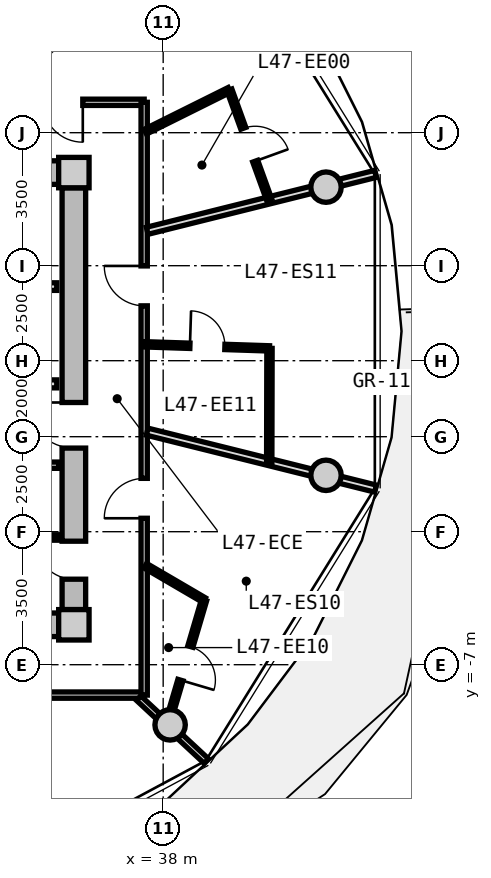
"""IFC4 building model, lengths in metres.
Left out: names, types, materials, properties, quantities, classifications, styles, units other than length and angle.
Written with IfcOpenShell. Run it as: python <this file> out.ifc"""

import sys

from ifc_helpers import new_model, si_unit, direction, frame, frame_2d, origin, origin_2d, place, context, subcontext, project, spatial, rectangle, circle, extrude, source, transform, mapped, element, fill, save


model = new_model("IFC4")
c1 = context("Model", 3, precision=1e-05, world=origin(), true_north=direction((0.0, 1.0)))
c2 = subcontext(c1, "Body", "Model", "MODEL_VIEW")
j1 = project(units=[si_unit("LENGTHUNIT", "METRE"), si_unit("PLANEANGLEUNIT", "RADIAN")], contexts=[c1])
p1 = place(None, origin())
s1 = spatial("IfcSite", under=j1, at=p1, CompositionType="ELEMENT")
p2 = place(p1, origin())
s2 = spatial("IfcBuilding", under=s1, at=p2, CompositionType="ELEMENT")
p3 = place(p2, frame((0.0, 0.0, 152.6)))
s3 = spatial("IfcBuildingStorey", under=s2, at=p3, CompositionType="ELEMENT", Elevation=152.6)
m1 = source(origin(), c2, "Body", "SweptSolid", [
    extrude(rectangle(XDim=0.8, YDim=0.8, at=origin_2d()), origin(), (0.0, 0.0, 1.0), 3.05),
])
for number, where, z_axis, x_axis in (
    (1, (35.65, -5.95, 0.0), (0.0, 0.0, 1.0), (1.0, 0.0, 0.0)),
    (2, (35.65, 5.95, 0.0), (0.0, 0.0, 1.0), (1.0, 0.0, 0.0)),
):
    element("IfcColumn", number, at=place(p3, frame(where, z_axis=z_axis, x_axis=x_axis)), inside=s3, PredefinedType="COLUMN", context=c2, shape_type="MappedRepresentation", body=[
        mapped(m1, transform((0.0, 0.0, 0.0), x_axis=(1.0, 0.0, 0.0), y_axis=(0.0, 1.0, 0.0), z_axis=(0.0, 0.0, 1.0), scale=1.0)),
    ])
m2 = source(origin(), c2, "Body", "SweptSolid", [
    extrude(rectangle(XDim=14.5, YDim=0.62, at=frame_2d((7.25, 0.0))), origin(), (0.0, 0.0, 1.0), 2.81),
])
for number, where, z_axis, x_axis in (
    (3, (20.75, 5.95, 0.0), (0.0, 0.0, 1.0), (1.0, 0.0, 0.0)),
    (4, (35.25, -5.95, 0.0), (0.0, 0.0, 1.0), (-1.0, 0.0, 0.0)),
):
    element("IfcWall", number, at=place(p3, frame(where, z_axis=z_axis, x_axis=x_axis)), inside=s3, PredefinedType="SHEAR", context=c2, shape_type="MappedRepresentation", body=[
        mapped(m2, transform((0.0, 0.0, 0.0), x_axis=(1.0, 0.0, 0.0), y_axis=(0.0, 1.0, 0.0), z_axis=(0.0, 0.0, 1.0), scale=1.0)),
    ])
m3 = source(origin(), c2, "Body", "SweptSolid", [
    extrude(rectangle(XDim=11.1, YDim=0.62, at=frame_2d((5.55, 0.0))), origin(), (0.0, 0.0, 1.0), 2.81),
])
p4 = place(p3, frame((35.65, 5.55, 0.0), z_axis=(0.0, 0.0, 1.0), x_axis=(0.0, -1.0, 0.0)))
e5 = element("IfcWall", 5, at=p4, inside=s3, PredefinedType="SHEAR", context=c2, shape_type="MappedRepresentation", body=[
    mapped(m3, transform((0.0, 0.0, 0.0), x_axis=(1.0, 0.0, 0.0), y_axis=(0.0, 1.0, 0.0), z_axis=(0.0, 0.0, 1.0), scale=1.0)),
])
p5 = place(p4, frame((5.65, 0.0, 0.0)))
e6 = element("IfcOpeningElement", 6, at=p5, cuts=e5, PredefinedType="OPENING", context=c2, shape_type="SweptSolid", body=[
    extrude(rectangle(XDim=1.2, YDim=2.15, at=frame_2d((0.6, 1.075))), frame((0.0, 0.32, 0.0), z_axis=(0.0, -1.0, 0.0), x_axis=(1.0, 0.0, 0.0)), (0.0, 0.0, 1.0), 0.64),
])
p6 = place(p4, frame((9.3, 0.0, 0.0)))
e7 = element("IfcOpeningElement", 7, at=p6, cuts=e5, PredefinedType="OPENING", context=c2, shape_type="SweptSolid", body=[
    extrude(rectangle(XDim=1.0, YDim=2.1, at=frame_2d((0.5, 1.05))), frame((0.0, 0.32, 0.0), z_axis=(0.0, -1.0, 0.0), x_axis=(1.0, 0.0, 0.0)), (0.0, 0.0, 1.0), 0.64),
])
m4 = source(origin(), c2, "Body", "SweptSolid", [
    extrude(circle(Radius=0.4, at=origin_2d()), origin(), (0.0, 0.0, 1.0), 3.05),
])
for number, where, z_axis, x_axis in (
    (8, (42.285, 5.567, 0.0), (0.0, 0.0, 1.0), (1.0, 0.0, 0.0)),
    (9, (38.183, -8.584, 0.0), (0.0, 0.0, 1.0), (1.0, 0.0, 0.0)),
    (10, (42.285, -2.016, 0.0), (0.0, 0.0, 1.0), (1.0, 0.0, 0.0)),
):
    element("IfcColumn", number, at=place(p3, frame(where, z_axis=z_axis, x_axis=x_axis)), inside=s3, PredefinedType="COLUMN", context=c2, shape_type="MappedRepresentation", body=[
        mapped(m4, transform((0.0, 0.0, 0.0), x_axis=(1.0, 0.0, 0.0), y_axis=(0.0, 1.0, 0.0), z_axis=(0.0, 0.0, 1.0), scale=1.0)),
    ])
m5 = source(origin(), c2, "Body", "SweptSolid", [
    extrude(rectangle(XDim=3.2, YDim=0.2, at=frame_2d((1.6, 0.0))), origin(), (0.0, 0.0, 1.0), 2.795),
])
p7 = place(p3, frame((32.0, 2.95, 0.0), z_axis=(0.0, 0.0, 1.0), x_axis=(1.0, 0.0, 0.0)))
e11 = element("IfcWall", 11, at=p7, inside=s3, PredefinedType="PARTITIONING", context=c2, shape_type="MappedRepresentation", body=[
    mapped(m5, transform((0.0, 0.0, 0.0), x_axis=(1.0, 0.0, 0.0), y_axis=(0.0, 1.0, 0.0), z_axis=(0.0, 0.0, 1.0), scale=1.0)),
])
m6 = source(origin(), c2, "Body", "SweptSolid", [
    extrude(rectangle(XDim=6.66, YDim=0.21, at=frame_2d((3.33, 0.0))), origin(), (0.0, 0.0, 1.0), 2.795),
])
p8 = place(p3, frame((28.54, 0.39, 0.0), z_axis=(0.0, 0.0, 1.0), x_axis=(1.0, 0.0, 0.0)))
e12 = element("IfcWall", 12, at=p8, inside=s3, PredefinedType="PARTITIONING", context=c2, shape_type="MappedRepresentation", body=[
    mapped(m6, transform((0.0, 0.0, 0.0), x_axis=(1.0, 0.0, 0.0), y_axis=(0.0, 1.0, 0.0), z_axis=(0.0, 0.0, 1.0), scale=1.0)),
])
p9 = place(p8, frame((1.0, 0.0, 0.0)))
e13 = element("IfcOpeningElement", 13, at=p9, cuts=e12, PredefinedType="OPENING", context=c2, shape_type="SweptSolid", body=[
    extrude(rectangle(XDim=1.2, YDim=2.15, at=frame_2d((0.6, 1.075))), frame((0.0, 0.115, 0.0), z_axis=(0.0, -1.0, 0.0), x_axis=(1.0, 0.0, 0.0)), (0.0, 0.0, 1.0), 0.23),
])
m7 = source(origin(), c2, "Body", "SweptSolid", [
    extrude(rectangle(XDim=2.7, YDim=0.165, at=frame_2d((1.35, 0.0))), origin(), (0.0, 0.0, 1.0), 2.795),
])
p10 = place(p3, frame((32.55, -1.75, 0.0), z_axis=(0.0, 0.0, 1.0), x_axis=(1.0, 0.0, 0.0)))
e14 = element("IfcWall", 14, at=p10, inside=s3, PredefinedType="PARTITIONING", context=c2, shape_type="MappedRepresentation", body=[
    mapped(m7, transform((0.0, 0.0, 0.0), x_axis=(1.0, 0.0, 0.0), y_axis=(0.0, 1.0, 0.0), z_axis=(0.0, 0.0, 1.0), scale=1.0)),
])
p11 = place(p10, frame((0.85, 0.0, 0.0)))
e15 = element("IfcOpeningElement", 15, at=p11, cuts=e14, PredefinedType="OPENING", context=c2, shape_type="SweptSolid", body=[
    extrude(rectangle(XDim=0.925, YDim=2.1, at=frame_2d((0.462, 1.05))), frame((0.0, 0.093, 0.0), z_axis=(0.0, -1.0, 0.0), x_axis=(1.0, 0.0, 0.0)), (0.0, 0.0, 1.0), 0.185),
])
m8 = source(origin(), c2, "Body", "SweptSolid", [
    extrude(rectangle(XDim=2.7, YDim=0.14, at=frame_2d((1.35, 0.0))), origin(), (0.0, 0.0, 1.0), 2.795),
])
p12 = place(p3, frame((32.55, -3.65, 0.0), z_axis=(0.0, 0.0, 1.0), x_axis=(1.0, 0.0, 0.0)))
e16 = element("IfcWall", 16, at=p12, inside=s3, PredefinedType="PARTITIONING", context=c2, shape_type="MappedRepresentation", body=[
    mapped(m8, transform((0.0, 0.0, 0.0), x_axis=(1.0, 0.0, 0.0), y_axis=(0.0, 1.0, 0.0), z_axis=(0.0, 0.0, 1.0), scale=1.0)),
])
m9 = source(origin(), c2, "Body", "SweptSolid", [
    extrude(rectangle(XDim=8.719, YDim=0.165, at=frame_2d((4.36, 0.0))), origin(), (0.0, 0.0, 1.0), 2.795),
])
p13 = place(p3, frame((28.781, 7.8, 0.0), z_axis=(0.0, 0.0, 1.0), x_axis=(1.0, 0.0, 0.0)))
e17 = element("IfcWall", 17, at=p13, inside=s3, PredefinedType="PARTITIONING", context=c2, shape_type="MappedRepresentation", body=[
    mapped(m9, transform((0.0, 0.0, 0.0), x_axis=(1.0, 0.0, 0.0), y_axis=(0.0, 1.0, 0.0), z_axis=(0.0, 0.0, 1.0), scale=1.0)),
])
p14 = place(p13, frame((6.054, 0.0, 0.0)))
e18 = element("IfcOpeningElement", 18, at=p14, cuts=e17, PredefinedType="OPENING", context=c2, shape_type="SweptSolid", body=[
    extrude(rectangle(XDim=1.05, YDim=2.15, at=frame_2d((0.525, 1.075))), frame((0.0, 0.093, 0.0), z_axis=(0.0, -1.0, 0.0), x_axis=(1.0, 0.0, 0.0)), (0.0, 0.0, 1.0), 0.185),
])
p15 = place(p13, frame((1.891, 0.0, 0.0)))
e19 = element("IfcOpeningElement", 19, at=p15, cuts=e17, PredefinedType="OPENING", context=c2, shape_type="SweptSolid", body=[
    extrude(rectangle(XDim=1.25, YDim=2.2, at=frame_2d((0.625, 1.1))), frame((0.0, 0.093, 0.0), z_axis=(0.0, -1.0, 0.0), x_axis=(1.0, 0.0, 0.0)), (0.0, 0.0, 1.0), 0.185),
])
m10 = source(origin(), c2, "Body", "SweptSolid", [
    extrude(rectangle(XDim=8.6, YDim=0.165, at=frame_2d((4.3, 0.0))), origin(), (0.0, 0.0, 1.0), 2.795),
])
p16 = place(p3, frame((37.5, -7.8, 0.0), z_axis=(0.0, 0.0, 1.0), x_axis=(-1.0, 0.0, 0.0)))
e20 = element("IfcWall", 20, at=p16, inside=s3, PredefinedType="PARTITIONING", context=c2, shape_type="MappedRepresentation", body=[
    mapped(m10, transform((0.0, 0.0, 0.0), x_axis=(1.0, 0.0, 0.0), y_axis=(0.0, 1.0, 0.0), z_axis=(0.0, 0.0, 1.0), scale=1.0)),
])
p17 = place(p16, frame((3.359, 0.0, 0.0)))
e21 = element("IfcOpeningElement", 21, at=p17, cuts=e20, PredefinedType="OPENING", context=c2, shape_type="SweptSolid", body=[
    extrude(rectangle(XDim=1.05, YDim=2.15, at=frame_2d((0.525, 1.075))), frame((0.0, 0.093, 0.0), z_axis=(0.0, -1.0, 0.0), x_axis=(1.0, 0.0, 0.0)), (0.0, 0.0, 1.0), 0.185),
])
m11 = source(origin(), c2, "Body", "SweptSolid", [
    extrude(rectangle(XDim=15.6, YDim=0.165, at=frame_2d((7.8, 0.0))), origin(), (0.0, 0.0, 1.0), 2.795),
])
p18 = place(p3, frame((37.5, 7.8, 0.0), z_axis=(0.0, 0.0, 1.0), x_axis=(0.0, -1.0, 0.0)))
e22 = element("IfcWall", 22, at=p18, inside=s3, PredefinedType="PARTITIONING", context=c2, shape_type="MappedRepresentation", body=[
    mapped(m11, transform((0.0, 0.0, 0.0), x_axis=(1.0, 0.0, 0.0), y_axis=(0.0, 1.0, 0.0), z_axis=(0.0, 0.0, 1.0), scale=1.0)),
])
p19 = place(p18, frame((9.896, 0.0, 0.0)))
e23 = element("IfcOpeningElement", 23, at=p19, cuts=e22, PredefinedType="OPENING", context=c2, shape_type="SweptSolid", body=[
    extrude(rectangle(XDim=1.05, YDim=2.15, at=frame_2d((0.525, 1.075))), frame((0.0, 0.093, 0.0), z_axis=(0.0, -1.0, 0.0), x_axis=(1.0, 0.0, 0.0)), (0.0, 0.0, 1.0), 0.185),
])
p20 = place(p18, frame((4.306, 0.0, 0.0)))
e24 = element("IfcOpeningElement", 24, at=p20, cuts=e22, PredefinedType="OPENING", context=c2, shape_type="SweptSolid", body=[
    extrude(rectangle(XDim=1.05, YDim=2.15, at=frame_2d((0.525, 1.075))), frame((0.0, 0.093, 0.0), z_axis=(0.0, -1.0, 0.0), x_axis=(1.0, 0.0, 0.0)), (0.0, 0.0, 1.0), 0.185),
])
m12 = source(origin(), c2, "Body", "SweptSolid", [
    extrude(rectangle(XDim=2.435, YDim=0.165, at=frame_2d((1.217, 0.0))), origin(), (0.0, 0.0, 1.0), 2.345),
])
p21 = place(p3, frame((37.354, -7.88, 0.0), z_axis=(0.0, 0.0, 1.0), x_axis=(0.732164643118, -0.681127693878, 0.0)))
e25 = element("IfcWall", 25, at=p21, inside=s3, PredefinedType="PARTITIONING", context=c2, shape_type="MappedRepresentation", body=[
    mapped(m12, transform((0.0, 0.0, 0.0), x_axis=(1.0, 0.0, 0.0), y_axis=(0.0, 1.0, 0.0), z_axis=(0.0, 0.0, 1.0), scale=1.0)),
])
m13 = source(origin(), c2, "Body", "SweptSolid", [
    extrude(rectangle(XDim=6.193, YDim=0.19, at=frame_2d((3.096, 0.0))), origin(), (0.0, 0.0, 1.0), 2.345),
])
p22 = place(p3, frame((37.58, -0.868, 0.0), z_axis=(0.0, 0.0, 1.0), x_axis=(0.970309243466, -0.241867674657, 0.0)))
e26 = element("IfcWall", 26, at=p22, inside=s3, PredefinedType="PARTITIONING", context=c2, shape_type="MappedRepresentation", body=[
    mapped(m13, transform((0.0, 0.0, 0.0), x_axis=(1.0, 0.0, 0.0), y_axis=(0.0, 1.0, 0.0), z_axis=(0.0, 0.0, 1.0), scale=1.0)),
])
m14 = source(origin(), c2, "Body", "SweptSolid", [
    extrude(rectangle(XDim=1.791, YDim=0.14, at=frame_2d((0.896, 0.0))), origin(), (0.0, 0.0, 1.0), 2.795),
])
p23 = place(p3, frame((37.53, -4.396, 0.0), z_axis=(0.0, 0.0, 1.0), x_axis=(0.863294053295, -0.504701275553, 0.0)))
e27 = element("IfcWall", 27, at=p23, inside=s3, PredefinedType="PARTITIONING", context=c2, shape_type="MappedRepresentation", body=[
    mapped(m14, transform((0.0, 0.0, 0.0), x_axis=(1.0, 0.0, 0.0), y_axis=(0.0, 1.0, 0.0), z_axis=(0.0, 0.0, 1.0), scale=1.0)),
])
m15 = source(origin(), c2, "Body", "SweptSolid", [
    extrude(rectangle(XDim=3.47, YDim=0.14, at=frame_2d((1.735, 0.0))), origin(), (0.0, 0.0, 1.0), 2.795),
])
p24 = place(p3, frame((39.076, -5.3, 0.0), z_axis=(0.0, 0.0, 1.0), x_axis=(-0.283194656898, -0.959062451723, 0.0)))
e28 = element("IfcWall", 28, at=p24, inside=s3, PredefinedType="PARTITIONING", context=c2, shape_type="MappedRepresentation", body=[
    mapped(m15, transform((0.0, 0.0, 0.0), x_axis=(1.0, 0.0, 0.0), y_axis=(0.0, 1.0, 0.0), z_axis=(0.0, 0.0, 1.0), scale=1.0)),
])
p25 = place(p24, frame((1.275, 0.0, 0.0)))
e29 = element("IfcOpeningElement", 29, at=p25, cuts=e28, PredefinedType="OPENING", context=c2, shape_type="SweptSolid", body=[
    extrude(rectangle(XDim=0.92, YDim=2.1, at=frame_2d((0.46, 1.05))), frame((0.0, 0.08, 0.0), z_axis=(0.0, -1.0, 0.0), x_axis=(1.0, 0.0, 0.0)), (0.0, 0.0, 1.0), 0.16),
])
p26 = place(p3, frame((37.58, 4.419, 0.0), z_axis=(0.0, 0.0, 1.0), x_axis=(0.970309243466, 0.241867674657, 0.0)))
e30 = element("IfcWall", 30, at=p26, inside=s3, PredefinedType="PARTITIONING", context=c2, shape_type="MappedRepresentation", body=[
    mapped(m13, transform((0.0, 0.0, 0.0), x_axis=(1.0, 0.0, 0.0), y_axis=(0.0, 1.0, 0.0), z_axis=(0.0, 0.0, 1.0), scale=1.0)),
])
m16 = source(origin(), c2, "Body", "SweptSolid", [
    extrude(rectangle(XDim=3.269, YDim=0.14, at=frame_2d((1.635, 0.0))), origin(), (0.0, 0.0, 1.0), 2.795),
])
p27 = place(p3, frame((37.53, 1.43, 0.0), z_axis=(0.0, 0.0, 1.0), x_axis=(0.999467384322, -0.032633536084, 0.0)))
e31 = element("IfcWall", 31, at=p27, inside=s3, PredefinedType="PARTITIONING", context=c2, shape_type="MappedRepresentation", body=[
    mapped(m16, transform((0.0, 0.0, 0.0), x_axis=(1.0, 0.0, 0.0), y_axis=(0.0, 1.0, 0.0), z_axis=(0.0, 0.0, 1.0), scale=1.0)),
])
p28 = place(p27, frame((1.175, 0.0, 0.0)))
e32 = element("IfcOpeningElement", 32, at=p28, cuts=e31, PredefinedType="OPENING", context=c2, shape_type="SweptSolid", body=[
    extrude(rectangle(XDim=0.92, YDim=2.1, at=frame_2d((0.46, 1.05))), frame((0.0, 0.08, 0.0), z_axis=(0.0, -1.0, 0.0), x_axis=(1.0, 0.0, 0.0)), (0.0, 0.0, 1.0), 0.16),
])
m17 = source(origin(), c2, "Body", "SweptSolid", [
    extrude(rectangle(XDim=3.012, YDim=0.14, at=frame_2d((1.506, 0.0))), origin(), (0.0, 0.0, 1.0), 2.795),
])
p29 = place(p3, frame((40.798, 1.324, 0.0), z_axis=(0.0, 0.0, 1.0), x_axis=(-0.00226958968, -0.999997424478, 0.0)))
e33 = element("IfcWall", 33, at=p29, inside=s3, PredefinedType="PARTITIONING", context=c2, shape_type="MappedRepresentation", body=[
    mapped(m17, transform((0.0, 0.0, 0.0), x_axis=(1.0, 0.0, 0.0), y_axis=(0.0, 1.0, 0.0), z_axis=(0.0, 0.0, 1.0), scale=1.0)),
])
m18 = source(origin(), c2, "Body", "SweptSolid", [
    extrude(rectangle(XDim=7.648, YDim=0.19, at=frame_2d((3.824, 0.0))), origin(), (0.0, 0.0, 1.0), 2.345),
])
p30 = place(p3, frame((33.538, 7.88, 0.0), z_axis=(0.0, 0.0, 1.0), x_axis=(0.732167856666, 0.681124239522, 0.0)))
e34 = element("IfcWall", 34, at=p30, inside=s3, PredefinedType="PARTITIONING", context=c2, shape_type="MappedRepresentation", body=[
    mapped(m18, transform((0.0, 0.0, 0.0), x_axis=(1.0, 0.0, 0.0), y_axis=(0.0, 1.0, 0.0), z_axis=(0.0, 0.0, 1.0), scale=1.0)),
])
m19 = source(origin(), c2, "Body", "SweptSolid", [
    extrude(rectangle(XDim=2.471, YDim=0.14, at=frame_2d((1.235, 0.0))), origin(), (0.0, 0.0, 1.0), 2.795),
])
p31 = place(p3, frame((37.53, 7.026, 0.0), z_axis=(0.0, 0.0, 1.0), x_axis=(0.895295102372, 0.445473545419, 0.0)))
e35 = element("IfcWall", 35, at=p31, inside=s3, PredefinedType="PARTITIONING", context=c2, shape_type="MappedRepresentation", body=[
    mapped(m19, transform((0.0, 0.0, 0.0), x_axis=(1.0, 0.0, 0.0), y_axis=(0.0, 1.0, 0.0), z_axis=(0.0, 0.0, 1.0), scale=1.0)),
])
m20 = source(origin(), c2, "Body", "SweptSolid", [
    extrude(rectangle(XDim=3.072, YDim=0.14, at=frame_2d((1.536, 0.0))), origin(), (0.0, 0.0, 1.0), 2.795),
])
p32 = place(p3, frame((39.742, 8.127, 0.0), z_axis=(0.0, 0.0, 1.0), x_axis=(0.340913456846, -0.94009468403, 0.0)))
e36 = element("IfcWall", 36, at=p32, inside=s3, PredefinedType="PARTITIONING", context=c2, shape_type="MappedRepresentation", body=[
    mapped(m20, transform((0.0, 0.0, 0.0), x_axis=(1.0, 0.0, 0.0), y_axis=(0.0, 1.0, 0.0), z_axis=(0.0, 0.0, 1.0), scale=1.0)),
])
p33 = place(p32, frame((1.076, 0.0, 0.0)))
e37 = element("IfcOpeningElement", 37, at=p33, cuts=e36, PredefinedType="OPENING", context=c2, shape_type="SweptSolid", body=[
    extrude(rectangle(XDim=0.92, YDim=2.1, at=frame_2d((0.46, 1.05))), frame((0.0, 0.08, 0.0), z_axis=(0.0, -1.0, 0.0), x_axis=(1.0, 0.0, 0.0)), (0.0, 0.0, 1.0), 0.16),
])
m21 = source(origin(), c2, "Body", "SweptSolid", [
    extrude(rectangle(XDim=1.2, YDim=2.15, at=frame_2d((0.6, 1.075))), frame((0.0, 0.025, 0.0), z_axis=(0.0, -1.0, 0.0), x_axis=(1.0, 0.0, 0.0)), (0.0, 0.0, 1.0), 0.05),
])
p34 = place(p5, frame((1.2, 0.0, 0.0), z_axis=(0.0, 0.0, 1.0), x_axis=(-1.0, 0.0, 0.0)))
e38 = element("IfcDoor", 38, at=p34, inside=s3, OperationType="SINGLE_SWING_RIGHT", PredefinedType="DOOR", context=c2, shape_type="MappedRepresentation", body=[
    mapped(m21, transform((0.0, 0.0, 0.0), x_axis=(1.0, 0.0, 0.0), y_axis=(0.0, 1.0, 0.0), z_axis=(0.0, 0.0, 1.0), scale=1.0)),
])
fill(e6, e38)
m22 = source(origin(), c2, "Body", "SweptSolid", [
    extrude(rectangle(XDim=1.0, YDim=2.1, at=frame_2d((0.5, 1.05))), frame((0.0, 0.025, 0.0), z_axis=(0.0, -1.0, 0.0), x_axis=(1.0, 0.0, 0.0)), (0.0, 0.0, 1.0), 0.05),
])
p35 = place(p6, frame((1.0, 0.0, 0.0), z_axis=(0.0, 0.0, 1.0), x_axis=(-1.0, 0.0, 0.0)))
e39 = element("IfcDoor", 39, at=p35, inside=s3, OperationType="SINGLE_SWING_RIGHT", PredefinedType="DOOR", context=c2, shape_type="MappedRepresentation", body=[
    mapped(m22, transform((0.0, 0.0, 0.0), x_axis=(1.0, 0.0, 0.0), y_axis=(0.0, 1.0, 0.0), z_axis=(0.0, 0.0, 1.0), scale=1.0)),
])
fill(e7, e39)
m23 = source(origin(), c2, "Body", "SweptSolid", [
    extrude(rectangle(XDim=1.05, YDim=2.15, at=frame_2d((0.525, 1.075))), frame((0.0, 0.025, 0.0), z_axis=(0.0, -1.0, 0.0), x_axis=(1.0, 0.0, 0.0)), (0.0, 0.0, 1.0), 0.05),
])
p36 = place(p19, frame((1.05, 0.0, 0.0), z_axis=(0.0, 0.0, 1.0), x_axis=(-1.0, 0.0, 0.0)))
e40 = element("IfcDoor", 40, at=p36, inside=s3, OperationType="SINGLE_SWING_LEFT", PredefinedType="DOOR", context=c2, shape_type="MappedRepresentation", body=[
    mapped(m23, transform((0.0, 0.0, 0.0), x_axis=(1.0, 0.0, 0.0), y_axis=(0.0, 1.0, 0.0), z_axis=(0.0, 0.0, 1.0), scale=1.0)),
])
fill(e23, e40)
m24 = source(origin(), c2, "Body", "SweptSolid", [
    extrude(rectangle(XDim=0.92, YDim=2.1, at=frame_2d((0.46, 1.05))), frame((0.0, 0.025, 0.0), z_axis=(0.0, -1.0, 0.0), x_axis=(1.0, 0.0, 0.0)), (0.0, 0.0, 1.0), 0.05),
])
p37 = place(p25, origin())
e41 = element("IfcDoor", 41, at=p37, inside=s3, OperationType="SINGLE_SWING_RIGHT", PredefinedType="DOOR", context=c2, shape_type="MappedRepresentation", body=[
    mapped(m24, transform((0.0, 0.0, 0.0), x_axis=(1.0, 0.0, 0.0), y_axis=(0.0, 1.0, 0.0), z_axis=(0.0, 0.0, 1.0), scale=1.0)),
])
fill(e29, e41)
p38 = place(p20, frame((1.05, 0.0, 0.0), z_axis=(0.0, 0.0, 1.0), x_axis=(-1.0, 0.0, 0.0)))
e42 = element("IfcDoor", 42, at=p38, inside=s3, OperationType="SINGLE_SWING_RIGHT", PredefinedType="DOOR", context=c2, shape_type="MappedRepresentation", body=[
    mapped(m23, transform((0.0, 0.0, 0.0), x_axis=(1.0, 0.0, 0.0), y_axis=(0.0, 1.0, 0.0), z_axis=(0.0, 0.0, 1.0), scale=1.0)),
])
fill(e24, e42)
p39 = place(p28, origin())
e43 = element("IfcDoor", 43, at=p39, inside=s3, OperationType="SINGLE_SWING_LEFT", PredefinedType="DOOR", context=c2, shape_type="MappedRepresentation", body=[
    mapped(m24, transform((0.0, 0.0, 0.0), x_axis=(1.0, 0.0, 0.0), y_axis=(0.0, 1.0, 0.0), z_axis=(0.0, 0.0, 1.0), scale=1.0)),
])
fill(e32, e43)
p40 = place(p14, frame((1.05, 0.0, 0.0), z_axis=(0.0, 0.0, 1.0), x_axis=(-1.0, 0.0, 0.0)))
e44 = element("IfcDoor", 44, at=p40, inside=s3, OperationType="SINGLE_SWING_LEFT", PredefinedType="DOOR", context=c2, shape_type="MappedRepresentation", body=[
    mapped(m23, transform((0.0, 0.0, 0.0), x_axis=(1.0, 0.0, 0.0), y_axis=(0.0, 1.0, 0.0), z_axis=(0.0, 0.0, 1.0), scale=1.0)),
])
fill(e18, e44)
p41 = place(p33, origin())
e45 = element("IfcDoor", 45, at=p41, inside=s3, OperationType="SINGLE_SWING_RIGHT", PredefinedType="DOOR", context=c2, shape_type="MappedRepresentation", body=[
    mapped(m24, transform((0.0, 0.0, 0.0), x_axis=(1.0, 0.0, 0.0), y_axis=(0.0, 1.0, 0.0), z_axis=(0.0, 0.0, 1.0), scale=1.0)),
])
fill(e37, e45)
save(model, sys.argv[1])
